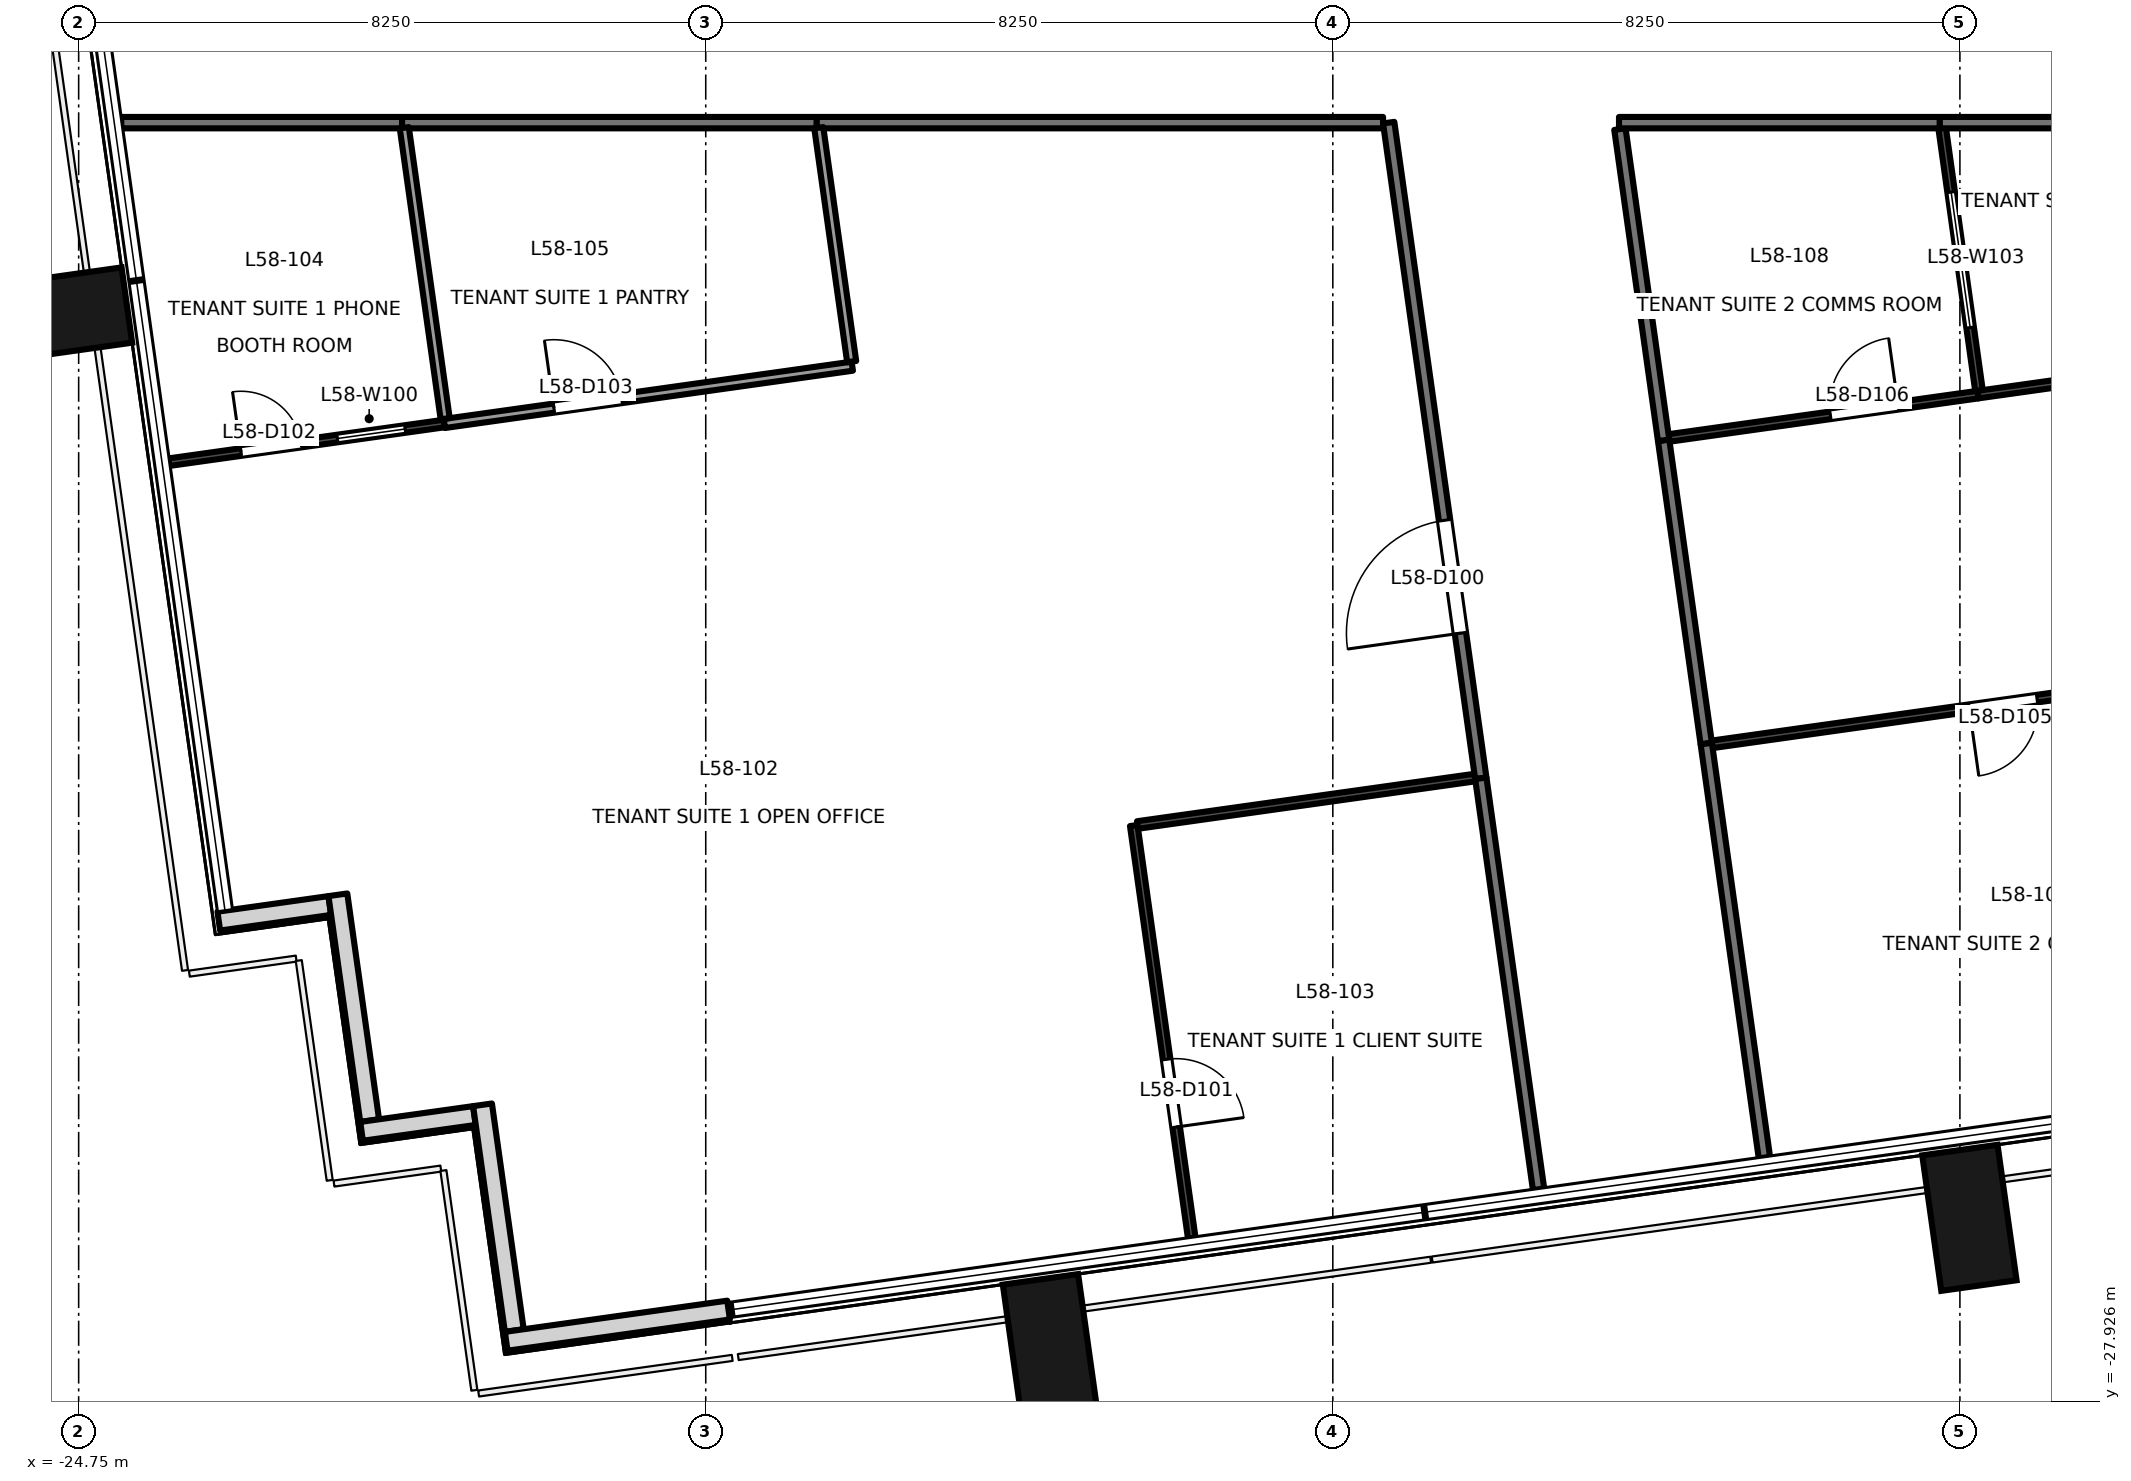
"""IFC4 building model, lengths in metres.
Left out: names, types, materials, properties, quantities, classifications, styles, units other than length and angle.
Written with IfcOpenShell. Run it as: python <this file> out.ifc"""

import sys

from ifc_helpers import new_model, si_unit, direction, frame, frame_2d, origin, origin_2d, place, context, subcontext, project, spatial, rectangle, extrude, element, fill, save


model = new_model("IFC4")
c1 = context("Model", 3, precision=1e-05, world=origin(), true_north=direction((0.0, 1.0)))
c2 = subcontext(c1, "Body", "Model", "MODEL_VIEW")
j1 = project(units=[si_unit("LENGTHUNIT", "METRE"), si_unit("PLANEANGLEUNIT", "RADIAN")], contexts=[c1])
p1 = place(None, origin())
s1 = spatial("IfcSite", under=j1, at=p1, CompositionType="ELEMENT")
p2 = place(p1, origin())
s2 = spatial("IfcBuilding", under=s1, at=p2, CompositionType="ELEMENT")
p3 = place(p2, frame((0.0, 0.0, 255.1)))
s3 = spatial("IfcBuildingStorey", under=s2, at=p3, CompositionType="ELEMENT", Elevation=255.1)
for number, where, z_axis, x_axis in (
    (1, (-11.971, -27.209, -0.2), (0.0, 0.0, 1.0), (0.99, 0.139, 0.0)),
    (2, (0.125, -25.508, -0.2), (0.0, 0.0, 1.0), (0.99, 0.139, 0.0)),
    (3, (-25.007, -13.625, -0.2), (0.0, 0.0, 1.0), (-0.139, 0.99, 0.0)),
):
    element("IfcColumn", number, at=place(p3, frame(where, z_axis=z_axis, x_axis=x_axis)), inside=s3, PredefinedType="COLUMN", context=c2, shape_type="SweptSolid", body=[
        extrude(rectangle(XDim=1.0, YDim=1.8, at=origin_2d()), origin(), (0.0, 0.0, 1.0), 3.9),
    ])
p4 = place(p3, frame((-22.906, -21.605, 0.0), z_axis=(0.0, 0.0, 1.0), x_axis=(0.990235520307, 0.13940449893, 0.0)))
e4 = element("IfcWall", 4, at=p4, inside=s3, PredefinedType="SOLIDWALL", context=c2, shape_type="SweptSolid", body=[
    extrude(rectangle(XDim=1.475, YDim=0.25, at=frame_2d((0.737, 0.0))), origin(), (0.0, 0.0, 1.0), 3.7),
])
p5 = place(p3, frame((-21.34, -21.258, 0.0), z_axis=(0.0, 0.0, 1.0), x_axis=(0.139393225799, -0.990237107263, 0.0)))
e5 = element("IfcWall", 5, at=p5, inside=s3, PredefinedType="SOLIDWALL", context=c2, shape_type="SweptSolid", body=[
    extrude(rectangle(XDim=3.0, YDim=0.25, at=frame_2d((1.5, 0.0))), origin(), (0.0, 0.0, 1.0), 3.7),
])
p6 = place(p3, frame((-21.028, -24.37, 0.0), z_axis=(0.0, 0.0, 1.0), x_axis=(0.990330117064, 0.138730887823, 0.0)))
e6 = element("IfcWall", 6, at=p6, inside=s3, PredefinedType="SOLIDWALL", context=c2, shape_type="SweptSolid", body=[
    extrude(rectangle(XDim=1.499, YDim=0.25, at=frame_2d((0.75, 0.0))), origin(), (0.0, 0.0, 1.0), 3.7),
])
p7 = place(p3, frame((-19.437, -24.021, 0.0), z_axis=(0.0, 0.0, 1.0), x_axis=(0.139358350296, -0.990242015975, 0.0)))
e7 = element("IfcWall", 7, at=p7, inside=s3, PredefinedType="SOLIDWALL", context=c2, shape_type="SweptSolid", body=[
    extrude(rectangle(XDim=2.999, YDim=0.25, at=frame_2d((1.5, 0.0))), origin(), (0.0, 0.0, 1.0), 3.7),
])
p8 = place(p3, frame((-19.125, -27.132, 0.0), z_axis=(0.0, 0.0, 1.0), x_axis=(0.990291981483, 0.139002846771, 0.0)))
e8 = element("IfcWall", 8, at=p8, inside=s3, PredefinedType="SOLIDWALL", context=c2, shape_type="SweptSolid", body=[
    extrude(rectangle(XDim=2.954, YDim=0.25, at=frame_2d((1.477, 0.0))), origin(), (0.0, 0.0, 1.0), 3.7),
])
p9 = place(p3, frame((-7.589, -11.1, 0.0), z_axis=(0.0, 0.0, 1.0), x_axis=(-1.0, 0.0, 0.0)))
e9 = element("IfcWall", 9, at=p9, inside=s3, PredefinedType="PARTITIONING", context=c2, shape_type="SweptSolid", body=[
    extrude(rectangle(XDim=7.453, YDim=0.15, at=frame_2d((3.727, 0.0))), origin(), (0.0, 0.0, 1.0), 2.8),
])
p10 = place(p3, frame((-6.303, -19.726, 0.0), z_axis=(0.0, 0.0, 1.0), x_axis=(-0.139129433731, 0.990274204789, 0.0)))
e10 = element("IfcWall", 10, at=p10, inside=s3, PredefinedType="PARTITIONING", context=c2, shape_type="SweptSolid", body=[
    extrude(rectangle(XDim=8.711, YDim=0.15, at=frame_2d((4.355, 0.0))), origin(), (0.0, 0.0, 1.0), 3.7),
])
p11 = place(p10, frame((1.928, 0.0, 0.0)))
e11 = element("IfcOpeningElement", 11, at=p11, cuts=e10, PredefinedType="OPENING", context=c2, shape_type="SweptSolid", body=[
    extrude(rectangle(XDim=1.5, YDim=2.1, at=frame_2d((0.75, 1.05))), frame((0.0, 0.085, 0.0), z_axis=(0.0, -1.0, 0.0), x_axis=(1.0, 0.0, 0.0)), (0.0, 0.0, 1.0), 0.171),
])
p12 = place(p3, frame((-5.543, -25.133, 0.0), z_axis=(0.0, 0.0, 1.0), x_axis=(-0.139192487281, 0.990265343978, 0.0)))
e12 = element("IfcWall", 12, at=p12, inside=s3, PredefinedType="PARTITIONING", context=c2, shape_type="SweptSolid", body=[
    extrude(rectangle(XDim=5.46, YDim=0.15, at=frame_2d((2.73, 0.0))), origin(), (0.0, 0.0, 1.0), 3.7),
])
p13 = place(p3, frame((-20.495, -11.1, 0.0), z_axis=(0.0, 0.0, 1.0), x_axis=(-1.0, 0.0, 0.0)))
e13 = element("IfcWall", 13, at=p13, inside=s3, PredefinedType="PARTITIONING", context=c2, shape_type="SweptSolid", body=[
    extrude(rectangle(XDim=3.695, YDim=0.15, at=frame_2d((1.847, 0.0))), origin(), (0.0, 0.0, 1.0), 3.7),
])
p14 = place(p3, frame((-15.042, -11.1, 0.0), z_axis=(0.0, 0.0, 1.0), x_axis=(-1.0, 0.0, 0.0)))
e14 = element("IfcWall", 14, at=p14, inside=s3, PredefinedType="PARTITIONING", context=c2, shape_type="SweptSolid", body=[
    extrude(rectangle(XDim=5.453, YDim=0.15, at=frame_2d((2.727, 0.0))), origin(), (0.0, 0.0, 1.0), 3.7),
])
p15 = place(p3, frame((-3.898, -15.279, 0.0), z_axis=(0.0, 0.0, 1.0), x_axis=(0.139240905476, -0.990258537071, 0.0)))
e15 = element("IfcWall", 15, at=p15, inside=s3, PredefinedType="PARTITIONING", context=c2, shape_type="SweptSolid", body=[
    extrude(rectangle(XDim=4.029, YDim=0.15, at=frame_2d((2.015, 0.0))), origin(), (0.0, 0.0, 1.0), 3.7),
])
p16 = place(p3, frame((-3.337, -19.269, 0.0), z_axis=(0.0, 0.0, 1.0), x_axis=(0.139059647431, -0.990284006968, 0.0)))
e16 = element("IfcWall", 16, at=p16, inside=s3, PredefinedType="PARTITIONING", context=c2, shape_type="SweptSolid", body=[
    extrude(rectangle(XDim=5.5, YDim=0.15, at=frame_2d((2.75, 0.0))), origin(), (0.0, 0.0, 1.0), 3.7),
])
p17 = place(p3, frame((-4.473, -11.185, 0.0), z_axis=(0.0, 0.0, 1.0), x_axis=(0.1390729581, -0.990282137739, 0.0)))
e17 = element("IfcWall", 17, at=p17, inside=s3, PredefinedType="PARTITIONING", context=c2, shape_type="SweptSolid", body=[
    extrude(rectangle(XDim=4.134, YDim=0.15, at=frame_2d((2.067, 0.0))), origin(), (0.0, 0.0, 1.0), 2.8),
])
p18 = place(p3, frame((-0.264, -11.1, 0.0), z_axis=(0.0, 0.0, 1.0), x_axis=(-1.0, 0.0, 0.0)))
e18 = element("IfcWall", 18, at=p18, inside=s3, PredefinedType="PARTITIONING", context=c2, shape_type="SweptSolid", body=[
    extrude(rectangle(XDim=4.221, YDim=0.15, at=frame_2d((2.111, 0.0))), origin(), (0.0, 0.0, 1.0), 2.8),
])
p19 = place(p3, frame((8.824, -11.1, 0.0), z_axis=(0.0, 0.0, 1.0), x_axis=(-1.0, 0.0, 0.0)))
e19 = element("IfcWall", 19, at=p19, inside=s3, PredefinedType="PARTITIONING", context=c2, shape_type="SweptSolid", body=[
    extrude(rectangle(XDim=9.088, YDim=0.15, at=frame_2d((4.544, 0.0))), origin(), (0.0, 0.0, 1.0), 2.9),
])
p20 = place(p3, frame((-10.869, -20.347, 0.0), z_axis=(0.0, 0.0, 1.0), x_axis=(0.139213194633, -0.990262433116, 0.0)))
e20 = element("IfcWall", 20, at=p20, inside=s3, PredefinedType="PARTITIONING", context=c2, shape_type="SweptSolid", body=[
    extrude(rectangle(XDim=5.48, YDim=0.1, at=frame_2d((2.74, 0.0))), origin(), (0.0, 0.0, 1.0), 3.7),
])
p21 = place(p20, frame((3.106, 0.0, 0.0)))
e21 = element("IfcOpeningElement", 21, at=p21, cuts=e20, PredefinedType="OPENING", context=c2, shape_type="SweptSolid", body=[
    extrude(rectangle(XDim=0.9, YDim=2.1, at=frame_2d((0.45, 1.05))), frame((0.0, 0.061, 0.0), z_axis=(0.0, -1.0, 0.0), x_axis=(1.0, 0.0, 0.0)), (0.0, 0.0, 1.0), 0.121),
])
p22 = place(p3, frame((-6.38, -19.716, 0.0), z_axis=(0.0, 0.0, 1.0), x_axis=(-0.990263970159, -0.139202260778, 0.0)))
e22 = element("IfcWall", 22, at=p22, inside=s3, PredefinedType="PARTITIONING", context=c2, shape_type="SweptSolid", body=[
    extrude(rectangle(XDim=4.483, YDim=0.1, at=frame_2d((2.241, 0.0))), origin(), (0.0, 0.0, 1.0), 2.8),
])
p23 = place(p3, frame((-23.563, -15.567, 0.0), z_axis=(0.0, 0.0, 1.0), x_axis=(0.990288176908, 0.139029948846, 0.0)))
e23 = element("IfcWall", 23, at=p23, inside=s3, PredefinedType="PARTITIONING", context=c2, shape_type="SweptSolid", body=[
    extrude(rectangle(XDim=3.66, YDim=0.1, at=frame_2d((1.83, 0.0))), origin(), (0.0, 0.0, 1.0), 3.7),
])
p24 = place(p23, frame((0.958, 0.0, 0.0)))
e24 = element("IfcOpeningElement", 24, at=p24, cuts=e23, PredefinedType="OPENING", context=c2, shape_type="SweptSolid", body=[
    extrude(rectangle(XDim=0.8, YDim=2.1, at=frame_2d((0.4, 1.05))), frame((0.0, 0.061, 0.0), z_axis=(0.0, -1.0, 0.0), x_axis=(1.0, 0.0, 0.0)), (0.0, 0.0, 1.0), 0.121),
])
p25 = place(p23, frame((2.239, 0.0, 0.9)))
e25 = element("IfcOpeningElement", 25, at=p25, cuts=e23, PredefinedType="OPENING", context=c2, shape_type="SweptSolid", body=[
    extrude(rectangle(XDim=0.9, YDim=1.2, at=frame_2d((0.45, 0.6))), frame((0.0, 0.061, 0.0), z_axis=(0.0, -1.0, 0.0), x_axis=(1.0, 0.0, 0.0)), (0.0, 0.0, 1.0), 0.121),
])
p26 = place(p3, frame((-19.939, -15.058, 0.0), z_axis=(0.0, 0.0, 1.0), x_axis=(0.99027122958, 0.139150608569, 0.0)))
e26 = element("IfcWall", 26, at=p26, inside=s3, PredefinedType="PARTITIONING", context=c2, shape_type="SweptSolid", body=[
    extrude(rectangle(XDim=5.42, YDim=0.12, at=frame_2d((2.71, 0.0))), origin(), (0.0, 0.0, 1.0), 3.7),
])
p27 = place(p26, frame((1.456, 0.0, 0.0)))
e27 = element("IfcOpeningElement", 27, at=p27, cuts=e26, PredefinedType="OPENING", context=c2, shape_type="SweptSolid", body=[
    extrude(rectangle(XDim=0.9, YDim=2.1, at=frame_2d((0.45, 1.05))), frame((0.0, 0.071, 0.0), z_axis=(0.0, -1.0, 0.0), x_axis=(1.0, 0.0, 0.0)), (0.0, 0.0, 1.0), 0.141),
])
p28 = place(p3, frame((-14.58, -14.244, 0.0), z_axis=(0.0, 0.0, 1.0), x_axis=(-0.139309006135, 0.990248959005, 0.0)))
e28 = element("IfcWall", 28, at=p28, inside=s3, PredefinedType="PARTITIONING", context=c2, shape_type="SweptSolid", body=[
    extrude(rectangle(XDim=3.107, YDim=0.12, at=frame_2d((1.554, 0.0))), origin(), (0.0, 0.0, 1.0), 3.7),
])
p29 = place(p3, frame((-20.466, -11.167, 0.0), z_axis=(0.0, 0.0, 1.0), x_axis=(0.139192901143, -0.990265285806, 0.0)))
e29 = element("IfcWall", 29, at=p29, inside=s3, PredefinedType="PARTITIONING", context=c2, shape_type="SweptSolid", body=[
    extrude(rectangle(XDim=3.866, YDim=0.12, at=frame_2d((1.933, 0.0))), origin(), (0.0, 0.0, 1.0), 3.7),
])
p30 = place(p3, frame((4.398, -18.202, 0.0), z_axis=(0.0, 0.0, 1.0), x_axis=(-0.990252156894, -0.139286272714, 0.0)))
e30 = element("IfcWall", 30, at=p30, inside=s3, PredefinedType="PARTITIONING", context=c2, shape_type="SweptSolid", body=[
    extrude(rectangle(XDim=7.733, YDim=0.1, at=frame_2d((3.867, 0.0))), origin(), (0.0, 0.0, 1.0), 2.9),
])
p31 = place(p30, frame((3.417, 0.0, 0.0)))
e31 = element("IfcOpeningElement", 31, at=p31, cuts=e30, PredefinedType="OPENING", context=c2, shape_type="SweptSolid", body=[
    extrude(rectangle(XDim=0.9, YDim=2.1, at=frame_2d((0.45, 1.05))), frame((0.0, 0.061, 0.0), z_axis=(0.0, -1.0, 0.0), x_axis=(1.0, 0.0, 0.0)), (0.0, 0.0, 1.0), 0.121),
])
p32 = place(p3, frame((-3.826, -15.248, 0.0), z_axis=(0.0, 0.0, 1.0), x_axis=(0.990304461309, 0.138913908276, 0.0)))
e32 = element("IfcWall", 32, at=p32, inside=s3, PredefinedType="PARTITIONING", context=c2, shape_type="SweptSolid", body=[
    extrude(rectangle(XDim=4.104, YDim=0.1, at=frame_2d((2.052, 0.0))), origin(), (0.0, 0.0, 1.0), 2.9),
])
p33 = place(p32, frame((2.143, 0.0, 0.0)))
e33 = element("IfcOpeningElement", 33, at=p33, cuts=e32, PredefinedType="OPENING", context=c2, shape_type="SweptSolid", body=[
    extrude(rectangle(XDim=0.9, YDim=2.1, at=frame_2d((0.45, 1.05))), frame((0.0, 0.061, 0.0), z_axis=(0.0, -1.0, 0.0), x_axis=(1.0, 0.0, 0.0)), (0.0, 0.0, 1.0), 0.121),
])
p34 = place(p3, frame((0.238, -14.678, 0.0), z_axis=(0.0, 0.0, 1.0), x_axis=(0.990261534953, 0.139219583367, 0.0)))
e34 = element("IfcWall", 34, at=p34, inside=s3, PredefinedType="PARTITIONING", context=c2, shape_type="SweptSolid", body=[
    extrude(rectangle(XDim=9.021, YDim=0.1, at=frame_2d((4.51, 0.0))), origin(), (0.0, 0.0, 1.0), 2.9),
])
p35 = place(p34, frame((4.11, 0.0, 0.0)))
e35 = element("IfcOpeningElement", 35, at=p35, cuts=e34, PredefinedType="OPENING", context=c2, shape_type="SweptSolid", body=[
    extrude(rectangle(XDim=0.8, YDim=2.1, at=frame_2d((0.4, 1.05))), frame((0.0, 0.061, 0.0), z_axis=(0.0, -1.0, 0.0), x_axis=(1.0, 0.0, 0.0)), (0.0, 0.0, 1.0), 0.121),
])
p36 = place(p34, frame((6.041, 0.0, 0.9)))
e36 = element("IfcOpeningElement", 36, at=p36, cuts=e34, PredefinedType="OPENING", context=c2, shape_type="SweptSolid", body=[
    extrude(rectangle(XDim=1.8, YDim=1.2, at=frame_2d((0.9, 0.6))), frame((0.0, 0.061, 0.0), z_axis=(0.0, -1.0, 0.0), x_axis=(1.0, 0.0, 0.0)), (0.0, 0.0, 1.0), 0.121),
])
p37 = place(p3, frame((-0.234, -11.168, 0.0), z_axis=(0.0, 0.0, 1.0), x_axis=(0.138894773338, -0.990307145253, 0.0)))
e37 = element("IfcWall", 37, at=p37, inside=s3, PredefinedType="PARTITIONING", context=c2, shape_type="SweptSolid", body=[
    extrude(rectangle(XDim=3.491, YDim=0.1, at=frame_2d((1.746, 0.0))), origin(), (0.0, 0.0, 1.0), 2.9),
])
p38 = place(p37, frame((0.854, 0.0, 0.9)))
e38 = element("IfcOpeningElement", 38, at=p38, cuts=e37, PredefinedType="OPENING", context=c2, shape_type="SweptSolid", body=[
    extrude(rectangle(XDim=1.8, YDim=1.2, at=frame_2d((0.9, 0.6))), frame((0.0, 0.061, 0.0), z_axis=(0.0, -1.0, 0.0), x_axis=(1.0, 0.0, 0.0)), (0.0, 0.0, 1.0), 0.121),
])
p39 = place(p11, origin())
e39 = element("IfcDoor", 39, at=p39, inside=s3, OperationType="DOUBLE_DOOR_SINGLE_SWING", PredefinedType="DOOR", context=c2, shape_type="SweptSolid", body=[
    extrude(rectangle(XDim=1.5, YDim=2.1, at=frame_2d((0.75, 1.05))), frame((0.0, 0.025, 0.0), z_axis=(0.0, -1.0, 0.0), x_axis=(1.0, 0.0, 0.0)), (0.0, 0.0, 1.0), 0.05),
])
fill(e11, e39)
p40 = place(p21, origin())
e40 = element("IfcDoor", 40, at=p40, inside=s3, OperationType="SINGLE_SWING_RIGHT", PredefinedType="DOOR", context=c2, shape_type="SweptSolid", body=[
    extrude(rectangle(XDim=0.9, YDim=2.1, at=frame_2d((0.45, 1.05))), frame((0.0, 0.025, 0.0), z_axis=(0.0, -1.0, 0.0), x_axis=(1.0, 0.0, 0.0)), (0.0, 0.0, 1.0), 0.05),
])
fill(e21, e40)
p41 = place(p24, origin())
e41 = element("IfcDoor", 41, at=p41, inside=s3, OperationType="SINGLE_SWING_LEFT", PredefinedType="DOOR", context=c2, shape_type="SweptSolid", body=[
    extrude(rectangle(XDim=0.8, YDim=2.1, at=frame_2d((0.4, 1.05))), frame((0.0, 0.025, 0.0), z_axis=(0.0, -1.0, 0.0), x_axis=(1.0, 0.0, 0.0)), (0.0, 0.0, 1.0), 0.05),
])
fill(e24, e41)
p42 = place(p27, origin())
e42 = element("IfcDoor", 42, at=p42, inside=s3, OperationType="SINGLE_SWING_LEFT", PredefinedType="DOOR", context=c2, shape_type="SweptSolid", body=[
    extrude(rectangle(XDim=0.9, YDim=2.1, at=frame_2d((0.45, 1.05))), frame((0.0, 0.025, 0.0), z_axis=(0.0, -1.0, 0.0), x_axis=(1.0, 0.0, 0.0)), (0.0, 0.0, 1.0), 0.05),
])
fill(e27, e42)
p43 = place(p31, origin())
e43 = element("IfcDoor", 43, at=p43, inside=s3, OperationType="SINGLE_SWING_RIGHT", PredefinedType="DOOR", context=c2, shape_type="SweptSolid", body=[
    extrude(rectangle(XDim=0.9, YDim=2.1, at=frame_2d((0.45, 1.05))), frame((0.0, 0.025, 0.0), z_axis=(0.0, -1.0, 0.0), x_axis=(1.0, 0.0, 0.0)), (0.0, 0.0, 1.0), 0.05),
])
fill(e31, e43)
p44 = place(p33, origin())
e44 = element("IfcDoor", 44, at=p44, inside=s3, OperationType="SINGLE_SWING_RIGHT", PredefinedType="DOOR", context=c2, shape_type="SweptSolid", body=[
    extrude(rectangle(XDim=0.9, YDim=2.1, at=frame_2d((0.45, 1.05))), frame((0.0, 0.025, 0.0), z_axis=(0.0, -1.0, 0.0), x_axis=(1.0, 0.0, 0.0)), (0.0, 0.0, 1.0), 0.05),
])
fill(e33, e44)
p45 = place(p25, origin())
e45 = element("IfcWindow", 45, at=p45, inside=s3, PartitioningType="SINGLE_PANEL", PredefinedType="WINDOW", context=c2, shape_type="SweptSolid", body=[
    extrude(rectangle(XDim=0.9, YDim=1.2, at=frame_2d((0.45, 0.6))), frame((0.0, 0.03, 0.0), z_axis=(0.0, -1.0, 0.0), x_axis=(1.0, 0.0, 0.0)), (0.0, 0.0, 1.0), 0.06),
])
fill(e25, e45)
p46 = place(p38, origin())
e46 = element("IfcWindow", 46, at=p46, inside=s3, PartitioningType="SINGLE_PANEL", PredefinedType="WINDOW", context=c2, shape_type="SweptSolid", body=[
    extrude(rectangle(XDim=1.8, YDim=1.2, at=frame_2d((0.9, 0.6))), frame((0.0, 0.03, 0.0), z_axis=(0.0, -1.0, 0.0), x_axis=(1.0, 0.0, 0.0)), (0.0, 0.0, 1.0), 0.06),
])
fill(e38, e46)
save(model, sys.argv[1])
